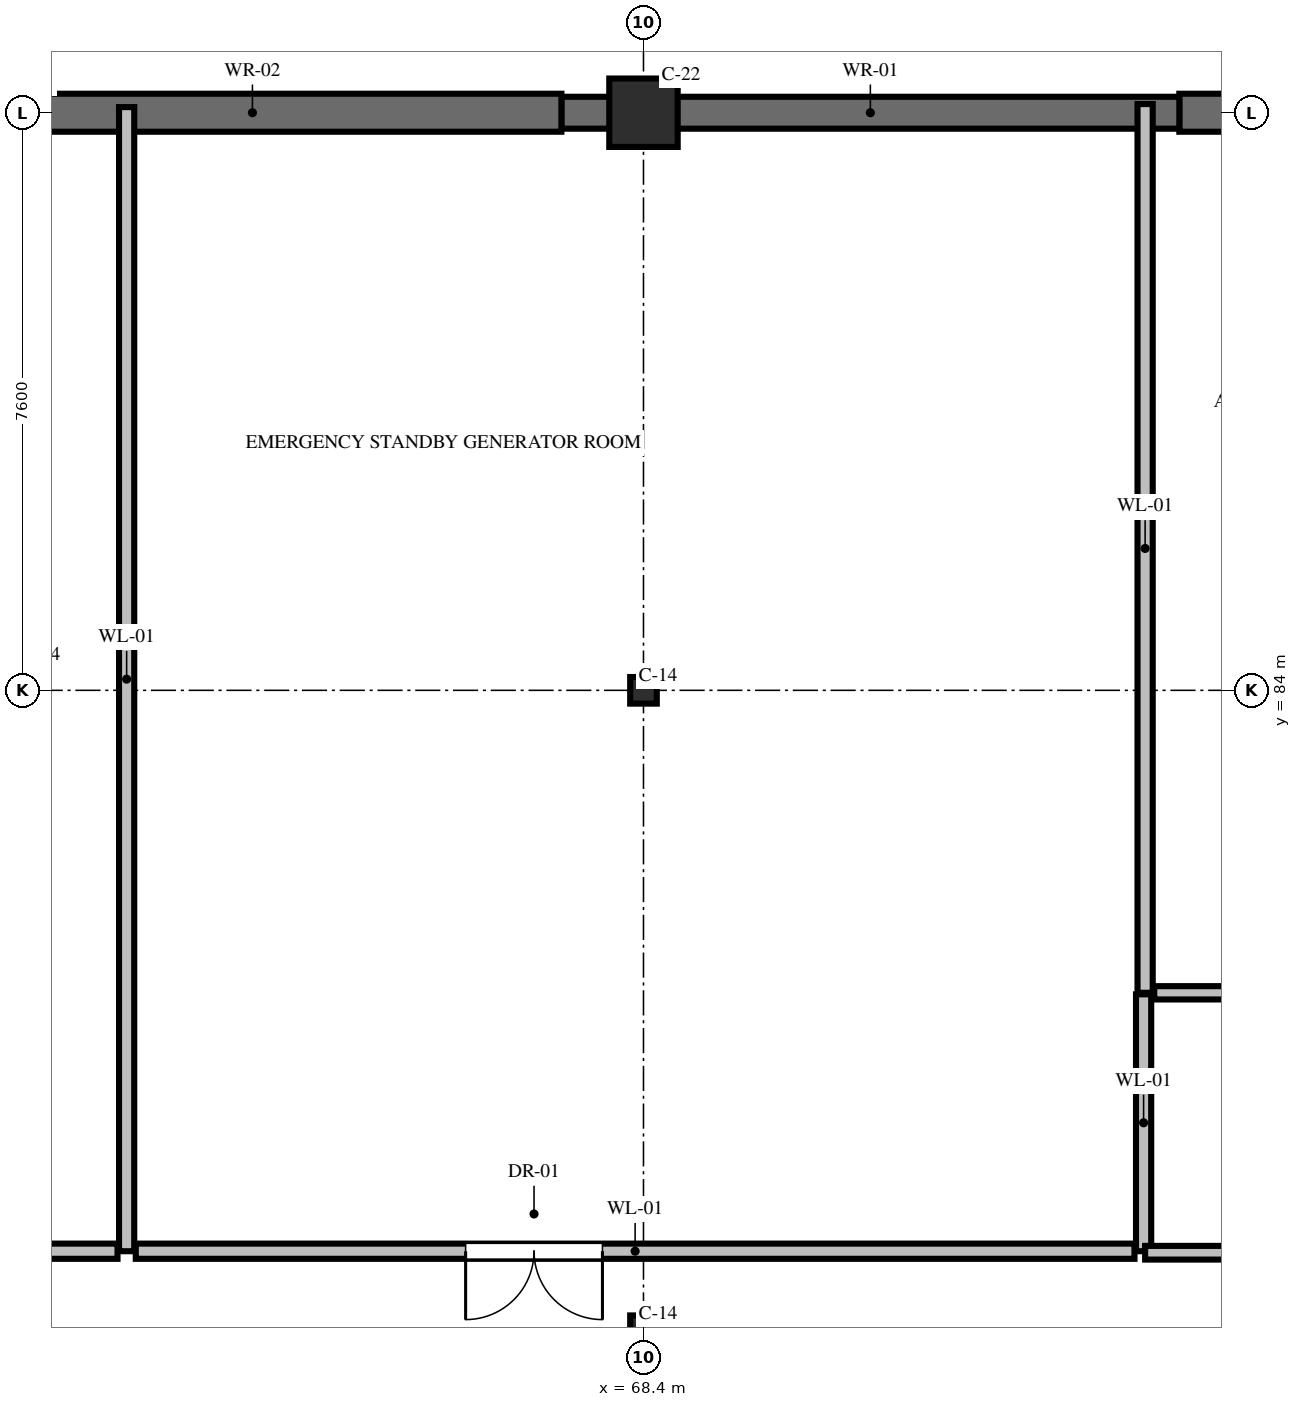
"""IFC4 building model, lengths in metres.
Left out: names, types, materials, properties, quantities, classifications, styles, units other than length and angle.
Written with IfcOpenShell. Run it as: python <this file> out.ifc"""

import sys

from ifc_helpers import new_model, si_unit, direction, frame, frame_2d, origin, origin_2d, place, context, subcontext, project, spatial, rectangle, hollow_rectangle, i_section, extrude, element, fill, save


model = new_model("IFC4")
c1 = context("Model", 3, precision=1e-05, world=origin(), true_north=direction((0.0, 1.0)))
c2 = subcontext(c1, "Body", "Model", "MODEL_VIEW")
j1 = project(units=[si_unit("LENGTHUNIT", "METRE"), si_unit("PLANEANGLEUNIT", "RADIAN")], contexts=[c1])
p1 = place(None, origin())
s1 = spatial("IfcSite", under=j1, at=p1, CompositionType="ELEMENT")
p2 = place(p1, origin())
s2 = spatial("IfcBuilding", under=s1, at=p2, CompositionType="ELEMENT")
p3 = place(p2, frame((0.0, 0.0, -4.8)))
s3 = spatial("IfcBuildingStorey", under=s2, at=p3, CompositionType="ELEMENT", Elevation=-4.8)
for number, where, z_axis, x_axis in (
    (1, (68.4, 75.6, 0.0), (0.0, 0.0, 1.0), (1.0, 0.0, 0.0)),
    (2, (68.4, 84.0, 0.0), (0.0, 0.0, 1.0), (1.0, 0.0, 0.0)),
):
    element("IfcColumn", number, at=place(p3, frame(where, z_axis=z_axis, x_axis=x_axis)), inside=s3, PredefinedType="COLUMN", context=c2, shape_type="SweptSolid", body=[
        extrude(i_section(OverallWidth=0.35, OverallDepth=0.35, WebThickness=0.012, FlangeThickness=0.019, FilletRadius=0.013, at=origin_2d()), origin(), (0.0, 0.0, 1.0), 4.8),
    ])
p4 = place(p3, frame((68.4, 91.6, 0.0), z_axis=(0.0, 0.0, 1.0), x_axis=(1.0, 0.0, 0.0)))
e3 = element("IfcColumn", 3, at=p4, inside=s3, PredefinedType="COLUMN", context=c2, shape_type="SweptSolid", body=[
    extrude(hollow_rectangle(XDim=0.9, YDim=0.9, WallThickness=0.036, InnerFilletRadius=0.036, OuterFilletRadius=0.072, at=origin_2d()), origin(), (0.0, 0.0, 1.0), 4.8),
])
p5 = place(p3, frame((83.58, 91.6, 0.0), z_axis=(0.0, 0.0, 1.0), x_axis=(-1.0, 0.0, 0.0)))
e4 = element("IfcWall", 4, at=p5, inside=s3, PredefinedType="USERDEFINED", context=c2, shape_type="SweptSolid", body=[
    extrude(rectangle(XDim=8.13, YDim=0.5, at=frame_2d((4.065, 0.0))), origin(), (0.0, 0.0, 1.0), 4.32),
])
p6 = place(p3, frame((75.45, 91.6, 0.0), z_axis=(0.0, 0.0, 1.0), x_axis=(-1.0, 0.0, 0.0)))
e5 = element("IfcWall", 5, at=p6, inside=s3, PredefinedType="USERDEFINED", context=c2, shape_type="SweptSolid", body=[
    extrude(rectangle(XDim=8.13, YDim=0.42, at=frame_2d((4.065, 0.0))), origin(), (0.0, 0.0, 1.0), 4.32),
])
p7 = place(p3, frame((67.32, 91.6, 0.0), z_axis=(0.0, 0.0, 1.0), x_axis=(-1.0, 0.0, 0.0)))
e6 = element("IfcWall", 6, at=p7, inside=s3, PredefinedType="USERDEFINED", context=c2, shape_type="SweptSolid", body=[
    extrude(rectangle(XDim=8.13, YDim=0.5, at=frame_2d((4.065, 0.0))), origin(), (0.0, 0.0, 1.0), 4.32),
])
p8 = place(p3, frame((61.6, 91.674, 0.0), z_axis=(0.0, 0.0, 1.0), x_axis=(0.0, -1.0, 0.0)))
e7 = element("IfcWall", 7, at=p8, inside=s3, PredefinedType="SOLIDWALL", context=c2, shape_type="SweptSolid", body=[
    extrude(rectangle(XDim=15.054, YDim=0.2, at=frame_2d((7.527, 0.0))), origin(), (0.0, 0.0, 1.0), 3.27),
])
p9 = place(p3, frame((61.48, 76.62, 0.0), z_axis=(0.0, 0.0, 1.0), x_axis=(-1.0, 0.0, 0.0)))
e8 = element("IfcWall", 8, at=p9, inside=s3, PredefinedType="SOLIDWALL", context=c2, shape_type="SweptSolid", body=[
    extrude(rectangle(XDim=14.68, YDim=0.2, at=frame_2d((7.34, 0.0))), origin(), (0.0, 0.0, 1.0), 3.47),
])
p10 = place(p9, frame((6.44, 0.0, 0.0)))
e9 = element("IfcOpeningElement", 9, at=p10, cuts=e8, PredefinedType="OPENING", context=c2, shape_type="SweptSolid", body=[
    extrude(rectangle(XDim=1.8, YDim=2.3, at=frame_2d((0.9, 1.15))), frame((0.0, 0.11, 0.0), z_axis=(0.0, -1.0, 0.0), x_axis=(1.0, 0.0, 0.0)), (0.0, 0.0, 1.0), 0.22),
])
p11 = place(p3, frame((75.0, 91.714, 0.0), z_axis=(0.0, 0.0, 1.0), x_axis=(0.0, -1.0, 0.0)))
e10 = element("IfcWall", 10, at=p11, inside=s3, PredefinedType="SOLIDWALL", context=c2, shape_type="SweptSolid", body=[
    extrude(rectangle(XDim=11.694, YDim=0.2, at=frame_2d((5.847, 0.0))), origin(), (0.0, 0.0, 1.0), 3.32),
])
p12 = place(p3, frame((74.98, 80.0, 0.0), z_axis=(0.0, 0.0, 1.0), x_axis=(0.0, -1.0, 0.0)))
e11 = element("IfcWall", 11, at=p12, inside=s3, PredefinedType="SOLIDWALL", context=c2, shape_type="SweptSolid", body=[
    extrude(rectangle(XDim=3.38, YDim=0.2, at=frame_2d((1.69, 0.0))), origin(), (0.0, 0.0, 1.0), 4.07),
])
p13 = place(p3, frame((74.86, 76.62, 0.0), z_axis=(0.0, 0.0, 1.0), x_axis=(-1.0, 0.0, 0.0)))
e12 = element("IfcWall", 12, at=p13, inside=s3, PredefinedType="SOLIDWALL", context=c2, shape_type="SweptSolid", body=[
    extrude(rectangle(XDim=13.14, YDim=0.2, at=frame_2d((6.57, 0.0))), origin(), (0.0, 0.0, 1.0), 3.87),
])
p14 = place(p13, frame((7.0, 0.0, 0.0)))
e13 = element("IfcOpeningElement", 13, at=p14, cuts=e12, PredefinedType="OPENING", context=c2, shape_type="SweptSolid", body=[
    extrude(rectangle(XDim=1.8, YDim=2.3, at=frame_2d((0.9, 1.15))), frame((0.0, 0.11, 0.0), z_axis=(0.0, -1.0, 0.0), x_axis=(1.0, 0.0, 0.0)), (0.0, 0.0, 1.0), 0.22),
])
p15 = place(p3, frame((81.66, 80.02, 0.0), z_axis=(0.0, 0.0, 1.0), x_axis=(-1.0, 0.0, 0.0)))
e14 = element("IfcWall", 14, at=p15, inside=s3, PredefinedType="PLUMBINGWALL", context=c2, shape_type="SweptSolid", body=[
    extrude(rectangle(XDim=6.54, YDim=0.175, at=frame_2d((3.27, 0.0))), origin(), (0.0, 0.0, 1.0), 3.62),
])
p16 = place(p15, frame((2.77, 0.0, 0.0)))
e15 = element("IfcOpeningElement", 15, at=p16, cuts=e14, PredefinedType="OPENING", context=c2, shape_type="SweptSolid", body=[
    extrude(rectangle(XDim=1.0, YDim=2.15, at=frame_2d((0.5, 1.075))), frame((0.0, 0.097, 0.0), z_axis=(0.0, -1.0, 0.0), x_axis=(1.0, 0.0, 0.0)), (0.0, 0.0, 1.0), 0.195),
])
p17 = place(p3, frame((81.68, 76.6, 0.0), z_axis=(0.0, 0.0, 1.0), x_axis=(-1.0, 0.0, 0.0)))
e16 = element("IfcWall", 16, at=p17, inside=s3, PredefinedType="PARTITIONING", context=c2, shape_type="SweptSolid", body=[
    extrude(rectangle(XDim=6.68, YDim=0.18, at=frame_2d((3.34, 0.0))), origin(), (0.0, 0.0, 1.0), 3.62),
])
p18 = place(p17, frame((2.54, 0.0, 0.0)))
e17 = element("IfcOpeningElement", 17, at=p18, cuts=e16, PredefinedType="OPENING", context=c2, shape_type="SweptSolid", body=[
    extrude(rectangle(XDim=1.6, YDim=2.2, at=frame_2d((0.8, 1.1))), frame((0.0, 0.1, 0.0), z_axis=(0.0, -1.0, 0.0), x_axis=(1.0, 0.0, 0.0)), (0.0, 0.0, 1.0), 0.2),
])
p19 = place(p14, origin())
e18 = element("IfcDoor", 18, at=p19, inside=s3, OperationType="DOUBLE_DOOR_SINGLE_SWING", PredefinedType="DOOR", context=c2, shape_type="SweptSolid", body=[
    extrude(rectangle(XDim=1.8, YDim=2.3, at=frame_2d((0.9, 1.15))), frame((0.0, 0.025, 0.0), z_axis=(0.0, -1.0, 0.0), x_axis=(1.0, 0.0, 0.0)), (0.0, 0.0, 1.0), 0.05),
])
fill(e13, e18)
save(model, sys.argv[1])
